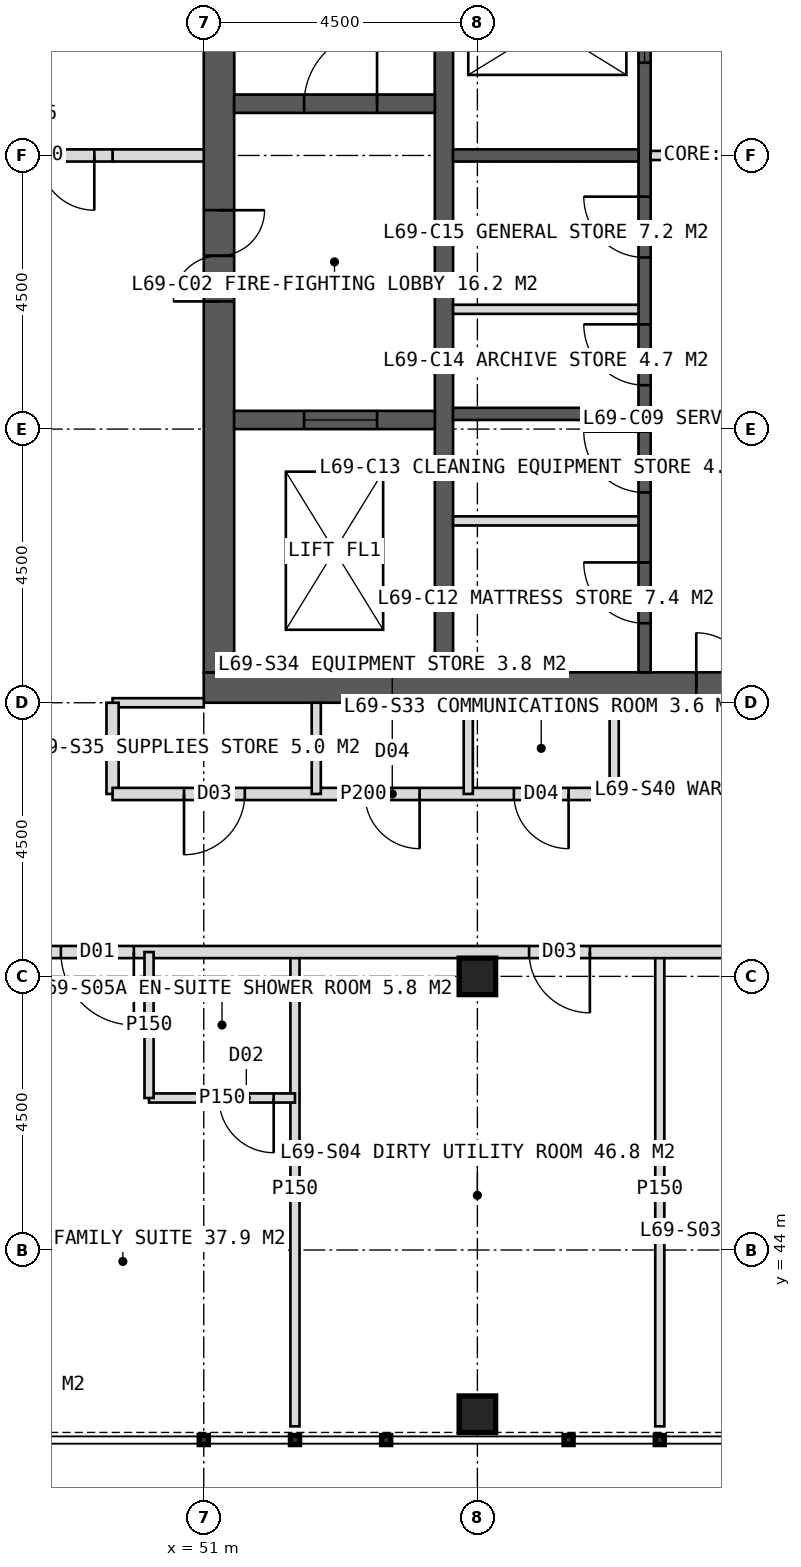
"""IFC4 building model, lengths in metres.
Left out: names, types, materials, properties, quantities, classifications, styles, units other than length and angle.
Written with IfcOpenShell. Run it as: python <this file> out.ifc"""

import sys

from ifc_helpers import new_model, si_unit, direction, frame, frame_2d, origin, origin_2d, place, context, subcontext, project, spatial, rectangle, hollow_rectangle, extrude, element, fill, save


model = new_model("IFC4")
c1 = context("Model", 3, precision=1e-05, world=origin(), true_north=direction((0.0, 1.0)))
c2 = subcontext(c1, "Body", "Model", "MODEL_VIEW")
j1 = project(units=[si_unit("LENGTHUNIT", "METRE"), si_unit("PLANEANGLEUNIT", "RADIAN")], contexts=[c1])
p1 = place(None, origin())
s1 = spatial("IfcSite", under=j1, at=p1, CompositionType="ELEMENT")
p2 = place(p1, origin())
s2 = spatial("IfcBuilding", under=s1, at=p2, CompositionType="ELEMENT")
p3 = place(p2, frame((0.0, 0.0, 286.0)))
s3 = spatial("IfcBuildingStorey", under=s2, at=p3, CompositionType="ELEMENT", Elevation=286.0)
p4 = place(p3, frame((51.0, 53.25, 0.0), z_axis=(0.0, 0.0, 1.0), x_axis=(1.0, 0.0, 0.0)))
e1 = element("IfcWall", 1, at=p4, inside=s3, PredefinedType="SHEAR", context=c2, shape_type="SweptSolid", body=[
    extrude(rectangle(XDim=18.0, YDim=0.5, at=frame_2d((9.0, 0.0))), origin(), (0.0, 0.0, 1.0), 4.0),
])
p5 = place(p4, frame((8.1, 0.0, 0.0)))
e2 = element("IfcOpeningElement", 2, at=p5, cuts=e1, PredefinedType="OPENING", context=c2, shape_type="SweptSolid", body=[
    extrude(rectangle(XDim=1.8, YDim=2.2, at=frame_2d((0.9, 1.1))), frame((0.0, 0.26, 0.0), z_axis=(0.0, -1.0, 0.0), x_axis=(1.0, 0.0, 0.0)), (0.0, 0.0, 1.0), 0.52),
])
p6 = place(p3, frame((51.25, 53.5, 0.0), z_axis=(0.0, 0.0, 1.0), x_axis=(0.0, 1.0, 0.0)))
e3 = element("IfcWall", 3, at=p6, inside=s3, PredefinedType="SHEAR", context=c2, shape_type="SweptSolid", body=[
    extrude(rectangle(XDim=17.0, YDim=0.5, at=frame_2d((8.5, 0.0))), origin(), (0.0, 0.0, 1.0), 4.0),
])
p7 = place(p6, frame((6.1, 0.0, 0.0)))
e4 = element("IfcOpeningElement", 4, at=p7, cuts=e3, PredefinedType="OPENING", context=c2, shape_type="SweptSolid", body=[
    extrude(rectangle(XDim=1.5, YDim=2.2, at=frame_2d((0.75, 1.1))), frame((0.0, 0.26, 0.0), z_axis=(0.0, -1.0, 0.0), x_axis=(1.0, 0.0, 0.0)), (0.0, 0.0, 1.0), 0.52),
])
p8 = place(p3, frame((54.95, 53.5, 0.0), z_axis=(0.0, 0.0, 1.0), x_axis=(0.0, 1.0, 0.0)))
e5 = element("IfcWall", 5, at=p8, inside=s3, PredefinedType="SHEAR", context=c2, shape_type="SweptSolid", body=[
    extrude(rectangle(XDim=17.0, YDim=0.3, at=frame_2d((8.5, 0.0))), origin(), (0.0, 0.0, 1.0), 4.0),
])
p9 = place(p3, frame((58.25, 53.5, 0.0), z_axis=(0.0, 0.0, 1.0), x_axis=(0.0, 1.0, 0.0)))
e6 = element("IfcWall", 6, at=p9, inside=s3, PredefinedType="SHEAR", context=c2, shape_type="SweptSolid", body=[
    extrude(rectangle(XDim=17.0, YDim=0.2, at=frame_2d((8.5, 0.0))), origin(), (0.0, 0.0, 1.0), 4.0),
])
p10 = place(p9, frame((0.808, 0.0, 0.0)))
e7 = element("IfcOpeningElement", 7, at=p10, cuts=e6, PredefinedType="OPENING", context=c2, shape_type="SweptSolid", body=[
    extrude(rectangle(XDim=1.0, YDim=2.1, at=frame_2d((0.5, 1.05))), frame((0.0, 0.11, 0.0), z_axis=(0.0, -1.0, 0.0), x_axis=(1.0, 0.0, 0.0)), (0.0, 0.0, 1.0), 0.22),
])
p11 = place(p9, frame((2.958, 0.0, 0.0)))
e8 = element("IfcOpeningElement", 8, at=p11, cuts=e6, PredefinedType="OPENING", context=c2, shape_type="SweptSolid", body=[
    extrude(rectangle(XDim=1.0, YDim=2.1, at=frame_2d((0.5, 1.05))), frame((0.0, 0.11, 0.0), z_axis=(0.0, -1.0, 0.0), x_axis=(1.0, 0.0, 0.0)), (0.0, 0.0, 1.0), 0.22),
])
p12 = place(p9, frame((4.722, 0.0, 0.0)))
e9 = element("IfcOpeningElement", 9, at=p12, cuts=e6, PredefinedType="OPENING", context=c2, shape_type="SweptSolid", body=[
    extrude(rectangle(XDim=1.0, YDim=2.1, at=frame_2d((0.5, 1.05))), frame((0.0, 0.11, 0.0), z_axis=(0.0, -1.0, 0.0), x_axis=(1.0, 0.0, 0.0)), (0.0, 0.0, 1.0), 0.22),
])
p13 = place(p9, frame((6.823, 0.0, 0.0)))
e10 = element("IfcOpeningElement", 10, at=p13, cuts=e6, PredefinedType="OPENING", context=c2, shape_type="SweptSolid", body=[
    extrude(rectangle(XDim=1.0, YDim=2.1, at=frame_2d((0.5, 1.05))), frame((0.0, 0.11, 0.0), z_axis=(0.0, -1.0, 0.0), x_axis=(1.0, 0.0, 0.0)), (0.0, 0.0, 1.0), 0.22),
])
p14 = place(p9, frame((10.025, 0.0, 0.0)))
e11 = element("IfcOpeningElement", 11, at=p14, cuts=e6, PredefinedType="OPENING", context=c2, shape_type="SweptSolid", body=[
    extrude(rectangle(XDim=1.4, YDim=2.2, at=frame_2d((0.7, 1.1))), frame((0.0, 0.11, 0.0), z_axis=(0.0, -1.0, 0.0), x_axis=(1.0, 0.0, 0.0)), (0.0, 0.0, 1.0), 0.22),
])
p15 = place(p9, frame((14.325, 0.0, 0.0)))
e12 = element("IfcOpeningElement", 12, at=p15, cuts=e6, PredefinedType="OPENING", context=c2, shape_type="SweptSolid", body=[
    extrude(rectangle(XDim=1.4, YDim=2.2, at=frame_2d((0.7, 1.1))), frame((0.0, 0.11, 0.0), z_axis=(0.0, -1.0, 0.0), x_axis=(1.0, 0.0, 0.0)), (0.0, 0.0, 1.0), 0.22),
])
for number, where, z_axis, x_axis in (
    (13, (55.1, 57.75, 0.0), (0.0, 0.0, 1.0), (1.0, 0.0, 0.0)),
    (14, (55.1, 62.0, 0.0), (0.0, 0.0, 1.0), (1.0, 0.0, 0.0)),
):
    element("IfcWall", number, at=place(p3, frame(where, z_axis=z_axis, x_axis=x_axis)), inside=s3, PredefinedType="SHEAR", context=c2, shape_type="SweptSolid", body=[
        extrude(rectangle(XDim=3.05, YDim=0.2, at=frame_2d((1.525, 0.0))), origin(), (0.0, 0.0, 1.0), 4.0),
    ])
p16 = place(p3, frame((51.5, 62.85, 0.0), z_axis=(0.0, 0.0, 1.0), x_axis=(1.0, 0.0, 0.0)))
e15 = element("IfcWall", 15, at=p16, inside=s3, PredefinedType="SHEAR", context=c2, shape_type="SweptSolid", body=[
    extrude(rectangle(XDim=3.3, YDim=0.3, at=frame_2d((1.65, 0.0))), origin(), (0.0, 0.0, 1.0), 4.0),
])
p17 = place(p16, frame((1.15, 0.0, 0.0)))
e16 = element("IfcOpeningElement", 16, at=p17, cuts=e15, PredefinedType="OPENING", context=c2, shape_type="SweptSolid", body=[
    extrude(rectangle(XDim=1.2, YDim=2.1, at=frame_2d((0.6, 1.05))), frame((0.0, 0.16, 0.0), z_axis=(0.0, -1.0, 0.0), x_axis=(1.0, 0.0, 0.0)), (0.0, 0.0, 1.0), 0.32),
])
p18 = place(p3, frame((51.5, 57.65, 0.0), z_axis=(0.0, 0.0, 1.0), x_axis=(1.0, 0.0, 0.0)))
e17 = element("IfcWall", 17, at=p18, inside=s3, PredefinedType="SHEAR", context=c2, shape_type="SweptSolid", body=[
    extrude(rectangle(XDim=3.3, YDim=0.3, at=frame_2d((1.65, 0.0))), origin(), (0.0, 0.0, 1.0), 4.0),
])
p19 = place(p18, frame((1.15, 0.0, 0.0)))
e18 = element("IfcOpeningElement", 18, at=p19, cuts=e17, PredefinedType="OPENING", context=c2, shape_type="SweptSolid", body=[
    extrude(rectangle(XDim=1.2, YDim=2.2, at=frame_2d((0.6, 1.1))), frame((0.0, 0.16, 0.0), z_axis=(0.0, -1.0, 0.0), x_axis=(1.0, 0.0, 0.0)), (0.0, 0.0, 1.0), 0.32),
])
for number, where, z_axis, x_axis in (
    (19, (55.5, 48.5, 0.0), (0.0, 0.0, 1.0), (1.0, 0.0, 0.0)),
    (20, (55.5, 41.3, 0.0), (0.0, 0.0, 1.0), (1.0, 0.0, 0.0)),
):
    element("IfcColumn", number, at=place(p3, frame(where, z_axis=z_axis, x_axis=x_axis)), inside=s3, PredefinedType="COLUMN", context=c2, shape_type="SweptSolid", body=[
        extrude(hollow_rectangle(XDim=0.6, YDim=0.6, WallThickness=0.04, at=origin_2d()), origin(), (0.0, 0.0, 1.0), 4.0),
    ])
p20 = place(p3, frame((51.0, 53.0, 0.0), z_axis=(0.0, 0.0, 1.0), x_axis=(-1.0, 0.0, 0.0)))
e21 = element("IfcWall", 21, at=p20, inside=s3, PredefinedType="PARTITIONING", context=c2, shape_type="SweptSolid", body=[
    extrude(rectangle(XDim=1.5, YDim=0.15, at=frame_2d((0.75, 0.0))), origin(), (0.0, 0.0, 1.0), 3.75),
])
p21 = place(p3, frame((51.0, 62.0, 0.0), z_axis=(0.0, 0.0, 1.0), x_axis=(-1.0, 0.0, 0.0)))
e22 = element("IfcWall", 22, at=p21, inside=s3, PredefinedType="SOLIDWALL", context=c2, shape_type="SweptSolid", body=[
    extrude(rectangle(XDim=1.5, YDim=0.2, at=frame_2d((0.75, 0.0))), origin(), (0.0, 0.0, 1.0), 2.997),
])
p22 = place(p3, frame((49.5, 51.5, 0.0), z_axis=(0.0, 0.0, 1.0), x_axis=(0.0, 1.0, 0.0)))
e23 = element("IfcWall", 23, at=p22, inside=s3, PredefinedType="PARTITIONING", context=c2, shape_type="SweptSolid", body=[
    extrude(rectangle(XDim=1.5, YDim=0.2, at=frame_2d((0.75, 0.0))), origin(), (0.0, 0.0, 1.0), 3.75),
])
for number, where, z_axis, x_axis in (
    (24, (58.5, 48.9, 0.0), (0.0, 0.0, 1.0), (0.0, -1.0, 0.0)),
    (25, (52.5, 48.9, 0.0), (0.0, 0.0, 1.0), (0.0, -1.0, 0.0)),
):
    element("IfcWall", number, at=place(p3, frame(where, z_axis=z_axis, x_axis=x_axis)), inside=s3, PredefinedType="PARTITIONING", context=c2, shape_type="SweptSolid", body=[
        extrude(rectangle(XDim=7.8, YDim=0.15, at=frame_2d((3.9, 0.0))), origin(), (0.0, 0.0, 1.0), 3.75),
    ])
p23 = place(p3, frame((73.1, 48.9, 0.0), z_axis=(0.0, 0.0, 1.0), x_axis=(-1.0, 0.0, 0.0)))
e26 = element("IfcWall", 26, at=p23, inside=s3, PredefinedType="PARTITIONING", context=c2, shape_type="SweptSolid", body=[
    extrude(rectangle(XDim=26.2, YDim=0.2, at=frame_2d((13.1, 0.0))), origin(), (0.0, 0.0, 1.0), 3.75),
])
p24 = place(p23, frame((1.75, 0.0, 0.0)))
e27 = element("IfcOpeningElement", 27, at=p24, cuts=e26, PredefinedType="OPENING", context=c2, shape_type="SweptSolid", body=[
    extrude(rectangle(XDim=1.2, YDim=2.2, at=frame_2d((0.6, 1.1))), frame((0.0, 0.11, 0.0), z_axis=(0.0, -1.0, 0.0), x_axis=(1.0, 0.0, 0.0)), (0.0, 0.0, 1.0), 0.22),
])
p25 = place(p23, frame((6.75, 0.0, 0.0)))
e28 = element("IfcOpeningElement", 28, at=p25, cuts=e26, PredefinedType="OPENING", context=c2, shape_type="SweptSolid", body=[
    extrude(rectangle(XDim=1.0, YDim=2.1, at=frame_2d((0.5, 1.05))), frame((0.0, 0.11, 0.0), z_axis=(0.0, -1.0, 0.0), x_axis=(1.0, 0.0, 0.0)), (0.0, 0.0, 1.0), 0.22),
])
p26 = place(p23, frame((11.85, 0.0, 0.0)))
e29 = element("IfcOpeningElement", 29, at=p26, cuts=e26, PredefinedType="OPENING", context=c2, shape_type="SweptSolid", body=[
    extrude(rectangle(XDim=1.0, YDim=2.1, at=frame_2d((0.5, 1.05))), frame((0.0, 0.11, 0.0), z_axis=(0.0, -1.0, 0.0), x_axis=(1.0, 0.0, 0.0)), (0.0, 0.0, 1.0), 0.22),
])
p27 = place(p23, frame((15.75, 0.0, 0.0)))
e30 = element("IfcOpeningElement", 30, at=p27, cuts=e26, PredefinedType="OPENING", context=c2, shape_type="SweptSolid", body=[
    extrude(rectangle(XDim=1.0, YDim=2.1, at=frame_2d((0.5, 1.05))), frame((0.0, 0.11, 0.0), z_axis=(0.0, -1.0, 0.0), x_axis=(1.0, 0.0, 0.0)), (0.0, 0.0, 1.0), 0.22),
])
p28 = place(p23, frame((23.25, 0.0, 0.0)))
e31 = element("IfcOpeningElement", 31, at=p28, cuts=e26, PredefinedType="OPENING", context=c2, shape_type="SweptSolid", body=[
    extrude(rectangle(XDim=1.2, YDim=2.2, at=frame_2d((0.6, 1.1))), frame((0.0, 0.11, 0.0), z_axis=(0.0, -1.0, 0.0), x_axis=(1.0, 0.0, 0.0)), (0.0, 0.0, 1.0), 0.22),
])
p29 = place(p3, frame((52.5, 46.5, 0.0), z_axis=(0.0, 0.0, 1.0), x_axis=(-1.0, 0.0, 0.0)))
e32 = element("IfcWall", 32, at=p29, inside=s3, PredefinedType="PARTITIONING", context=c2, shape_type="SweptSolid", body=[
    extrude(rectangle(XDim=2.4, YDim=0.15, at=frame_2d((1.2, 0.0))), origin(), (0.0, 0.0, 1.0), 3.75),
])
p30 = place(p29, frame((0.35, 0.0, 0.0)))
e33 = element("IfcOpeningElement", 33, at=p30, cuts=e32, PredefinedType="OPENING", context=c2, shape_type="SweptSolid", body=[
    extrude(rectangle(XDim=0.9, YDim=2.1, at=frame_2d((0.45, 1.05))), frame((0.0, 0.085, 0.0), z_axis=(0.0, -1.0, 0.0), x_axis=(1.0, 0.0, 0.0)), (0.0, 0.0, 1.0), 0.17),
])
p31 = place(p3, frame((50.1, 48.9, 0.0), z_axis=(0.0, 0.0, 1.0), x_axis=(0.0, -1.0, 0.0)))
e34 = element("IfcWall", 34, at=p31, inside=s3, PredefinedType="PARTITIONING", context=c2, shape_type="SweptSolid", body=[
    extrude(rectangle(XDim=2.4, YDim=0.15, at=frame_2d((1.2, 0.0))), origin(), (0.0, 0.0, 1.0), 3.75),
])
p32 = place(p3, frame((57.75, 51.5, 0.0), z_axis=(0.0, 0.0, 1.0), x_axis=(-1.0, 0.0, 0.0)))
e35 = element("IfcWall", 35, at=p32, inside=s3, PredefinedType="PARTITIONING", context=c2, shape_type="SweptSolid", body=[
    extrude(rectangle(XDim=8.25, YDim=0.2, at=frame_2d((4.125, 0.0))), origin(), (0.0, 0.0, 1.0), 3.75),
])
p33 = place(p32, frame((0.75, 0.0, 0.0)))
e36 = element("IfcOpeningElement", 36, at=p33, cuts=e35, PredefinedType="OPENING", context=c2, shape_type="SweptSolid", body=[
    extrude(rectangle(XDim=0.9, YDim=2.1, at=frame_2d((0.45, 1.05))), frame((0.0, 0.11, 0.0), z_axis=(0.0, -1.0, 0.0), x_axis=(1.0, 0.0, 0.0)), (0.0, 0.0, 1.0), 0.22),
])
p34 = place(p32, frame((3.2, 0.0, 0.0)))
e37 = element("IfcOpeningElement", 37, at=p34, cuts=e35, PredefinedType="OPENING", context=c2, shape_type="SweptSolid", body=[
    extrude(rectangle(XDim=0.9, YDim=2.1, at=frame_2d((0.45, 1.05))), frame((0.0, 0.11, 0.0), z_axis=(0.0, -1.0, 0.0), x_axis=(1.0, 0.0, 0.0)), (0.0, 0.0, 1.0), 0.22),
])
p35 = place(p32, frame((6.075, 0.0, 0.0)))
e38 = element("IfcOpeningElement", 38, at=p35, cuts=e35, PredefinedType="OPENING", context=c2, shape_type="SweptSolid", body=[
    extrude(rectangle(XDim=1.0, YDim=2.1, at=frame_2d((0.5, 1.05))), frame((0.0, 0.11, 0.0), z_axis=(0.0, -1.0, 0.0), x_axis=(1.0, 0.0, 0.0)), (0.0, 0.0, 1.0), 0.22),
])
p36 = place(p3, frame((57.75, 53.0, 0.0), z_axis=(0.0, 0.0, 1.0), x_axis=(0.0, -1.0, 0.0)))
e39 = element("IfcWall", 39, at=p36, inside=s3, PredefinedType="PARTITIONING", context=c2, shape_type="SweptSolid", body=[
    extrude(rectangle(XDim=1.5, YDim=0.15, at=frame_2d((0.75, 0.0))), origin(), (0.0, 0.0, 1.0), 3.75),
])
p37 = place(p3, frame((55.35, 53.0, 0.0), z_axis=(0.0, 0.0, 1.0), x_axis=(0.0, -1.0, 0.0)))
e40 = element("IfcWall", 40, at=p37, inside=s3, PredefinedType="PARTITIONING", context=c2, shape_type="SweptSolid", body=[
    extrude(rectangle(XDim=1.5, YDim=0.15, at=frame_2d((0.75, 0.0))), origin(), (0.0, 0.0, 1.0), 2.95),
])
p38 = place(p3, frame((52.85, 53.0, 0.0), z_axis=(0.0, 0.0, 1.0), x_axis=(0.0, -1.0, 0.0)))
e41 = element("IfcWall", 41, at=p38, inside=s3, PredefinedType="PARTITIONING", context=c2, shape_type="SweptSolid", body=[
    extrude(rectangle(XDim=1.5, YDim=0.15, at=frame_2d((0.75, 0.0))), origin(), (0.0, 0.0, 1.0), 3.75),
])
p39 = place(p3, frame((49.5, 62.0, 0.0), z_axis=(0.0, 0.0, 1.0), x_axis=(-1.0, 0.0, 0.0)))
e42 = element("IfcWall", 42, at=p39, inside=s3, PredefinedType="SOLIDWALL", context=c2, shape_type="SweptSolid", body=[
    extrude(rectangle(XDim=2.6, YDim=0.2, at=frame_2d((1.3, 0.0))), origin(), (0.0, 0.0, 1.0), 2.997),
])
p40 = place(p39, frame((0.3, 0.0, 0.0)))
e43 = element("IfcOpeningElement", 43, at=p40, cuts=e42, PredefinedType="OPENING", context=c2, shape_type="SweptSolid", body=[
    extrude(rectangle(XDim=1.8, YDim=2.2, at=frame_2d((0.9, 1.1))), frame((0.0, 0.11, 0.0), z_axis=(0.0, -1.0, 0.0), x_axis=(1.0, 0.0, 0.0)), (0.0, 0.0, 1.0), 0.22),
])
for number, where, z_axis, x_axis in (
    (44, (55.1, 55.99, 0.0), (0.0, 0.0, 1.0), (1.0, 0.0, 0.0)),
    (45, (55.1, 59.47, 0.0), (0.0, 0.0, 1.0), (1.0, 0.0, 0.0)),
):
    element("IfcWall", number, at=place(p3, frame(where, z_axis=z_axis, x_axis=x_axis)), inside=s3, PredefinedType="PARTITIONING", context=c2, shape_type="SweptSolid", body=[
        extrude(rectangle(XDim=3.05, YDim=0.15, at=frame_2d((1.525, 0.0))), origin(), (0.0, 0.0, 1.0), 3.75),
    ])
p41 = place(p3, frame((58.35, 62.0, 0.0), z_axis=(0.0, 0.0, 1.0), x_axis=(1.0, 0.0, 0.0)))
e46 = element("IfcWall", 46, at=p41, inside=s3, PredefinedType="PARTITIONING", context=c2, shape_type="SweptSolid", body=[
    extrude(rectangle(XDim=3.3, YDim=0.15, at=frame_2d((1.65, 0.0))), origin(), (0.0, 0.0, 1.0), 3.75),
])
p42 = place(p27, origin())
e47 = element("IfcDoor", 47, at=p42, inside=s3, OperationType="SINGLE_SWING_LEFT", PredefinedType="DOOR", context=c2, shape_type="SweptSolid", body=[
    extrude(rectangle(XDim=1.0, YDim=2.1, at=frame_2d((0.5, 1.05))), frame((0.0, 0.025, 0.0), z_axis=(0.0, -1.0, 0.0), x_axis=(1.0, 0.0, 0.0)), (0.0, 0.0, 1.0), 0.05),
])
fill(e30, e47)
p43 = place(p28, origin())
e48 = element("IfcDoor", 48, at=p43, inside=s3, OperationType="SINGLE_SWING_LEFT", PredefinedType="DOOR", context=c2, shape_type="SweptSolid", body=[
    extrude(rectangle(XDim=1.2, YDim=2.2, at=frame_2d((0.6, 1.1))), frame((0.0, 0.025, 0.0), z_axis=(0.0, -1.0, 0.0), x_axis=(1.0, 0.0, 0.0)), (0.0, 0.0, 1.0), 0.05),
])
fill(e31, e48)
p44 = place(p30, origin())
e49 = element("IfcDoor", 49, at=p44, inside=s3, OperationType="SINGLE_SWING_LEFT", PredefinedType="DOOR", context=c2, shape_type="SweptSolid", body=[
    extrude(rectangle(XDim=0.9, YDim=2.1, at=frame_2d((0.45, 1.05))), frame((0.0, 0.025, 0.0), z_axis=(0.0, -1.0, 0.0), x_axis=(1.0, 0.0, 0.0)), (0.0, 0.0, 1.0), 0.05),
])
fill(e33, e49)
p45 = place(p33, origin())
e50 = element("IfcDoor", 50, at=p45, inside=s3, OperationType="SINGLE_SWING_LEFT", PredefinedType="DOOR", context=c2, shape_type="SweptSolid", body=[
    extrude(rectangle(XDim=0.9, YDim=2.1, at=frame_2d((0.45, 1.05))), frame((0.0, 0.025, 0.0), z_axis=(0.0, -1.0, 0.0), x_axis=(1.0, 0.0, 0.0)), (0.0, 0.0, 1.0), 0.05),
])
fill(e36, e50)
p46 = place(p34, origin())
e51 = element("IfcDoor", 51, at=p46, inside=s3, OperationType="SINGLE_SWING_LEFT", PredefinedType="DOOR", context=c2, shape_type="SweptSolid", body=[
    extrude(rectangle(XDim=0.9, YDim=2.1, at=frame_2d((0.45, 1.05))), frame((0.0, 0.025, 0.0), z_axis=(0.0, -1.0, 0.0), x_axis=(1.0, 0.0, 0.0)), (0.0, 0.0, 1.0), 0.05),
])
fill(e37, e51)
p47 = place(p35, origin())
e52 = element("IfcDoor", 52, at=p47, inside=s3, OperationType="SINGLE_SWING_RIGHT", PredefinedType="DOOR", context=c2, shape_type="SweptSolid", body=[
    extrude(rectangle(XDim=1.0, YDim=2.1, at=frame_2d((0.5, 1.05))), frame((0.0, 0.025, 0.0), z_axis=(0.0, -1.0, 0.0), x_axis=(1.0, 0.0, 0.0)), (0.0, 0.0, 1.0), 0.05),
])
fill(e38, e52)
p48 = place(p40, origin())
e53 = element("IfcDoor", 53, at=p48, inside=s3, OperationType="DOUBLE_DOOR_DOUBLE_SWING", PredefinedType="DOOR", context=c2, shape_type="SweptSolid", body=[
    extrude(rectangle(XDim=1.8, YDim=2.2, at=frame_2d((0.9, 1.1))), frame((0.0, 0.025, 0.0), z_axis=(0.0, -1.0, 0.0), x_axis=(1.0, 0.0, 0.0)), (0.0, 0.0, 1.0), 0.05),
])
fill(e43, e53)
p49 = place(p7, origin())
e54 = element("IfcDoor", 54, at=p49, inside=s3, OperationType="DOUBLE_DOOR_SINGLE_SWING", PredefinedType="DOOR", context=c2, shape_type="SweptSolid", body=[
    extrude(rectangle(XDim=1.5, YDim=2.2, at=frame_2d((0.75, 1.1))), frame((0.0, 0.025, 0.0), z_axis=(0.0, -1.0, 0.0), x_axis=(1.0, 0.0, 0.0)), (0.0, 0.0, 1.0), 0.05),
])
fill(e4, e54)
p50 = place(p17, origin())
e55 = element("IfcDoor", 55, at=p50, inside=s3, OperationType="SINGLE_SWING_RIGHT", PredefinedType="DOOR", context=c2, shape_type="SweptSolid", body=[
    extrude(rectangle(XDim=1.2, YDim=2.1, at=frame_2d((0.6, 1.05))), frame((0.0, 0.025, 0.0), z_axis=(0.0, -1.0, 0.0), x_axis=(1.0, 0.0, 0.0)), (0.0, 0.0, 1.0), 0.05),
])
fill(e16, e55)
p51 = place(p19, origin())
e56 = element("IfcDoor", 56, at=p51, inside=s3, OperationType="SLIDING_TO_LEFT", PredefinedType="DOOR", context=c2, shape_type="SweptSolid", body=[
    extrude(rectangle(XDim=1.2, YDim=2.2, at=frame_2d((0.6, 1.1))), frame((0.0, 0.025, 0.0), z_axis=(0.0, -1.0, 0.0), x_axis=(1.0, 0.0, 0.0)), (0.0, 0.0, 1.0), 0.05),
])
fill(e18, e56)
p52 = place(p10, origin())
e57 = element("IfcDoor", 57, at=p52, inside=s3, OperationType="SINGLE_SWING_RIGHT", PredefinedType="DOOR", context=c2, shape_type="SweptSolid", body=[
    extrude(rectangle(XDim=1.0, YDim=2.1, at=frame_2d((0.5, 1.05))), frame((0.0, 0.025, 0.0), z_axis=(0.0, -1.0, 0.0), x_axis=(1.0, 0.0, 0.0)), (0.0, 0.0, 1.0), 0.05),
])
fill(e7, e57)
p53 = place(p11, origin())
e58 = element("IfcDoor", 58, at=p53, inside=s3, OperationType="SINGLE_SWING_RIGHT", PredefinedType="DOOR", context=c2, shape_type="SweptSolid", body=[
    extrude(rectangle(XDim=1.0, YDim=2.1, at=frame_2d((0.5, 1.05))), frame((0.0, 0.025, 0.0), z_axis=(0.0, -1.0, 0.0), x_axis=(1.0, 0.0, 0.0)), (0.0, 0.0, 1.0), 0.05),
])
fill(e8, e58)
p54 = place(p12, origin())
e59 = element("IfcDoor", 59, at=p54, inside=s3, OperationType="SINGLE_SWING_RIGHT", PredefinedType="DOOR", context=c2, shape_type="SweptSolid", body=[
    extrude(rectangle(XDim=1.0, YDim=2.1, at=frame_2d((0.5, 1.05))), frame((0.0, 0.025, 0.0), z_axis=(0.0, -1.0, 0.0), x_axis=(1.0, 0.0, 0.0)), (0.0, 0.0, 1.0), 0.05),
])
fill(e9, e59)
p55 = place(p13, origin())
e60 = element("IfcDoor", 60, at=p55, inside=s3, OperationType="SINGLE_SWING_RIGHT", PredefinedType="DOOR", context=c2, shape_type="SweptSolid", body=[
    extrude(rectangle(XDim=1.0, YDim=2.1, at=frame_2d((0.5, 1.05))), frame((0.0, 0.025, 0.0), z_axis=(0.0, -1.0, 0.0), x_axis=(1.0, 0.0, 0.0)), (0.0, 0.0, 1.0), 0.05),
])
fill(e10, e60)
p56 = place(p14, origin())
e61 = element("IfcDoor", 61, at=p56, inside=s3, OperationType="SLIDING_TO_LEFT", PredefinedType="DOOR", context=c2, shape_type="SweptSolid", body=[
    extrude(rectangle(XDim=1.4, YDim=2.2, at=frame_2d((0.7, 1.1))), frame((0.0, 0.025, 0.0), z_axis=(0.0, -1.0, 0.0), x_axis=(1.0, 0.0, 0.0)), (0.0, 0.0, 1.0), 0.05),
])
fill(e11, e61)
p57 = place(p5, origin())
e62 = element("IfcDoor", 62, at=p57, inside=s3, OperationType="DOUBLE_DOOR_SINGLE_SWING", PredefinedType="DOOR", context=c2, shape_type="SweptSolid", body=[
    extrude(rectangle(XDim=1.8, YDim=2.2, at=frame_2d((0.9, 1.1))), frame((0.0, 0.025, 0.0), z_axis=(0.0, -1.0, 0.0), x_axis=(1.0, 0.0, 0.0)), (0.0, 0.0, 1.0), 0.05),
])
fill(e2, e62)
save(model, sys.argv[1])
